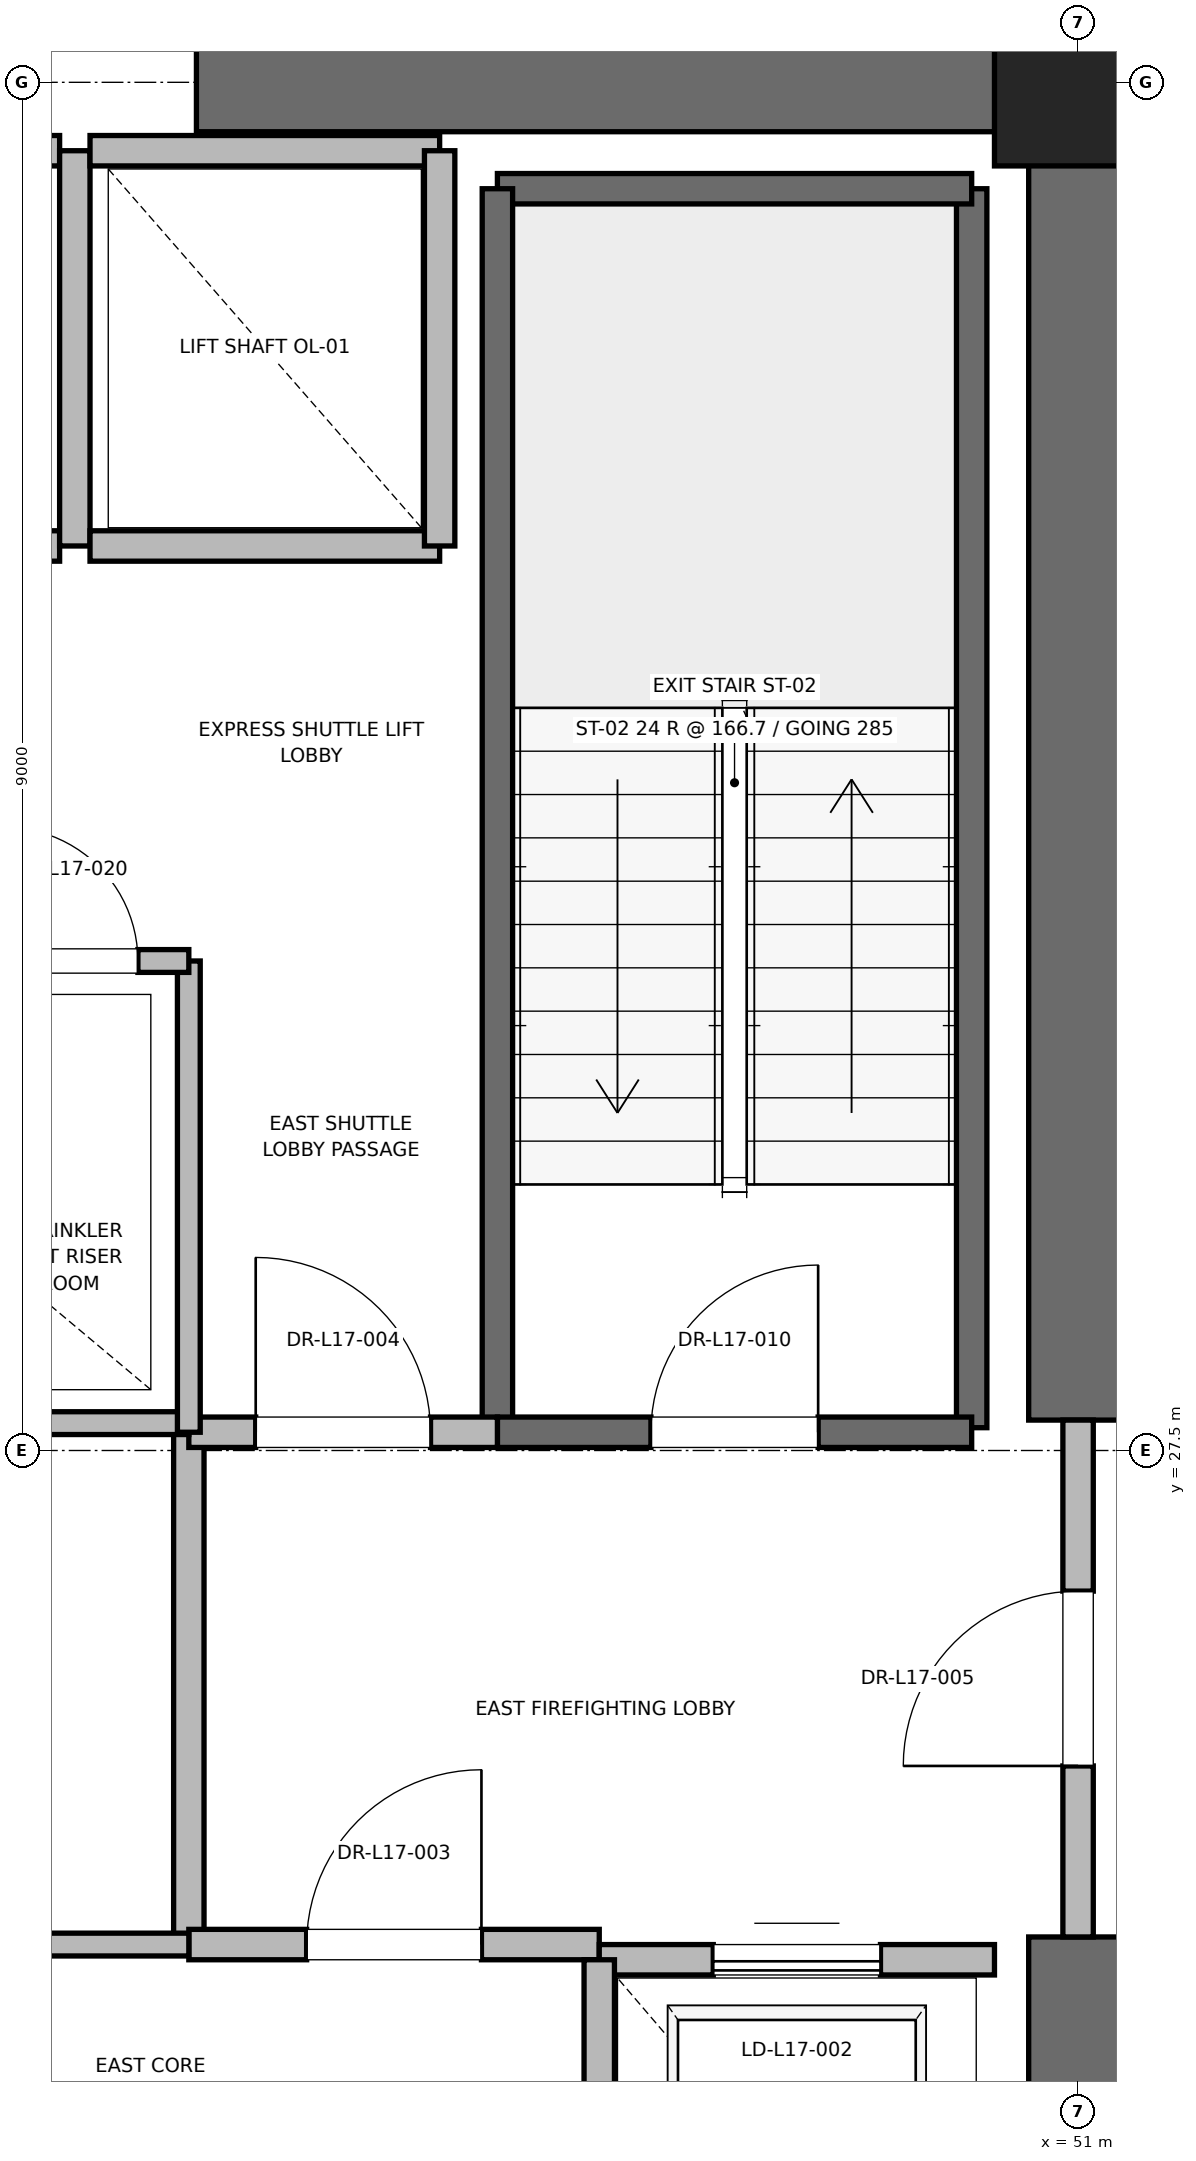
"""IFC4 building model, lengths in metres.
Left out: names, types, materials, properties, quantities, classifications, styles, units other than length and angle.
Written with IfcOpenShell. Run it as: python <this file> out.ifc"""

import sys

from ifc_helpers import new_model, si_unit, direction, frame, frame_2d, origin, origin_2d, place, context, subcontext, project, spatial, rectangle, extrude, element, fill, save


model = new_model("IFC4")
c1 = context("Model", 3, precision=1e-05, world=origin(), true_north=direction((0.0, 1.0)))
c2 = subcontext(c1, "Body", "Model", "MODEL_VIEW")
j1 = project(units=[si_unit("LENGTHUNIT", "METRE"), si_unit("PLANEANGLEUNIT", "RADIAN")], contexts=[c1])
p1 = place(None, origin())
s1 = spatial("IfcSite", under=j1, at=p1, CompositionType="ELEMENT")
p2 = place(p1, origin())
s2 = spatial("IfcBuilding", under=s1, at=p2, CompositionType="ELEMENT")
p3 = place(p2, frame((0.0, 0.0, 75.6)))
s3 = spatial("IfcBuildingStorey", under=s2, at=p3, CompositionType="ELEMENT", Elevation=75.6)
p4 = place(p3, frame((51.0, 36.5, 0.0), z_axis=(0.0, 0.0, 1.0), x_axis=(1.0, 0.0, 0.0)))
e1 = element("IfcColumn", 1, at=p4, inside=s3, PredefinedType="PILASTER", context=c2, shape_type="SweptSolid", body=[
    extrude(rectangle(XDim=1.1, YDim=1.1, at=origin_2d()), origin(), (0.0, 0.0, 1.0), 4.0),
])
for number, where, z_axis, x_axis in (
    (2, (45.2, 36.5, 0.0), (0.0, 0.0, 1.0), (1.0, 0.0, 0.0)),
    (3, (51.0, 18.5, 0.0), (0.0, 0.0, 1.0), (0.0, 1.0, 0.0)),
):
    element("IfcWall", number, at=place(p3, frame(where, z_axis=z_axis, x_axis=x_axis)), inside=s3, PredefinedType="SHEAR", context=c2, shape_type="SweptSolid", body=[
        extrude(rectangle(XDim=5.8, YDim=0.65, at=frame_2d((2.9, 0.0))), origin(), (0.0, 0.0, 1.0), 3.76),
    ])
p5 = place(p3, frame((51.0, 27.7, 0.0), z_axis=(0.0, 0.0, 1.0), x_axis=(0.0, 1.0, 0.0)))
e4 = element("IfcWall", 4, at=p5, inside=s3, PredefinedType="SHEAR", context=c2, shape_type="SweptSolid", body=[
    extrude(rectangle(XDim=8.8, YDim=0.65, at=frame_2d((4.4, 0.0))), origin(), (0.0, 0.0, 1.0), 3.76),
])
p6 = place(p3, frame((50.3, 27.65, 0.0), z_axis=(0.0, 0.0, 1.0), x_axis=(0.0, 1.0, 0.0)))
e5 = element("IfcWall", 5, at=p6, inside=s3, PredefinedType="SOLIDWALL", context=c2, shape_type="SweptSolid", body=[
    extrude(rectangle(XDim=8.15, YDim=0.2, at=frame_2d((4.075, 0.0))), origin(), (0.0, 0.0, 1.0), 3.76),
])
p7 = place(p3, frame((47.18, 35.8, 0.0), z_axis=(0.0, 0.0, 1.0), x_axis=(1.0, 0.0, 0.0)))
e6 = element("IfcWall", 6, at=p7, inside=s3, PredefinedType="SOLIDWALL", context=c2, shape_type="SweptSolid", body=[
    extrude(rectangle(XDim=3.12, YDim=0.2, at=frame_2d((1.56, 0.0))), origin(), (0.0, 0.0, 1.0), 3.76),
])
p8 = place(p3, frame((47.18, 27.62, 0.0), z_axis=(0.0, 0.0, 1.0), x_axis=(0.0, 1.0, 0.0)))
e7 = element("IfcWall", 7, at=p8, inside=s3, PredefinedType="SOLIDWALL", context=c2, shape_type="SweptSolid", body=[
    extrude(rectangle(XDim=8.18, YDim=0.2, at=frame_2d((4.09, 0.0))), origin(), (0.0, 0.0, 1.0), 3.76),
])
p9 = place(p3, frame((47.18, 27.62, 0.0), z_axis=(0.0, 0.0, 1.0), x_axis=(1.0, 0.0, 0.0)))
e8 = element("IfcWall", 8, at=p9, inside=s3, PredefinedType="SOLIDWALL", context=c2, shape_type="SweptSolid", body=[
    extrude(rectangle(XDim=3.12, YDim=0.2, at=frame_2d((1.56, 0.0))), origin(), (0.0, 0.0, 1.0), 3.76),
])
p10 = place(p9, frame((1.01, 0.0, 0.0)))
e9 = element("IfcOpeningElement", 9, at=p10, cuts=e8, PredefinedType="OPENING", context=c2, shape_type="SweptSolid", body=[
    extrude(rectangle(XDim=1.1, YDim=2.15, at=frame_2d((0.55, 1.075))), frame((0.0, 0.1, 0.0), z_axis=(0.0, -1.0, 0.0), x_axis=(1.0, 0.0, 0.0)), (0.0, 0.0, 1.0), 0.2),
])
p11 = place(p3, frame((45.15, 24.25, 0.0), z_axis=(0.0, 0.0, 1.0), x_axis=(0.0, 1.0, 0.0)))
e10 = element("IfcWall", 10, at=p11, inside=s3, PredefinedType="PARTITIONING", context=c2, shape_type="SweptSolid", body=[
    extrude(rectangle(XDim=3.37, YDim=0.2, at=frame_2d((1.685, 0.0))), origin(), (0.0, 0.0, 1.0), 3.76),
])
p12 = place(p3, frame((45.15, 24.25, 0.0), z_axis=(0.0, 0.0, 1.0), x_axis=(1.0, 0.0, 0.0)))
e11 = element("IfcWall", 11, at=p12, inside=s3, PredefinedType="PARTITIONING", context=c2, shape_type="SweptSolid", body=[
    extrude(rectangle(XDim=2.7, YDim=0.2, at=frame_2d((1.35, 0.0))), origin(), (0.0, 0.0, 1.0), 3.76),
])
p13 = place(p12, frame((0.775, 0.0, 0.0)))
e12 = element("IfcOpeningElement", 12, at=p13, cuts=e11, PredefinedType="OPENING", context=c2, shape_type="SweptSolid", body=[
    extrude(rectangle(XDim=1.15, YDim=2.2, at=frame_2d((0.575, 1.1))), frame((0.0, 0.1, 0.0), z_axis=(0.0, -1.0, 0.0), x_axis=(1.0, 0.0, 0.0)), (0.0, 0.0, 1.0), 0.2),
])
p14 = place(p3, frame((45.15, 27.62, 0.0), z_axis=(0.0, 0.0, 1.0), x_axis=(1.0, 0.0, 0.0)))
e13 = element("IfcWall", 13, at=p14, inside=s3, PredefinedType="PARTITIONING", context=c2, shape_type="SweptSolid", body=[
    extrude(rectangle(XDim=2.03, YDim=0.2, at=frame_2d((1.015, 0.0))), origin(), (0.0, 0.0, 1.0), 3.76),
])
p15 = place(p14, frame((0.44, 0.0, 0.0)))
e14 = element("IfcOpeningElement", 14, at=p15, cuts=e13, PredefinedType="OPENING", context=c2, shape_type="SweptSolid", body=[
    extrude(rectangle(XDim=1.15, YDim=2.2, at=frame_2d((0.575, 1.1))), frame((0.0, 0.1, 0.0), z_axis=(0.0, -1.0, 0.0), x_axis=(1.0, 0.0, 0.0)), (0.0, 0.0, 1.0), 0.2),
])
p16 = place(p3, frame((51.0, 24.3, 0.0), z_axis=(0.0, 0.0, 1.0), x_axis=(0.0, 1.0, 0.0)))
e15 = element("IfcWall", 15, at=p16, inside=s3, PredefinedType="PARTITIONING", context=c2, shape_type="SweptSolid", body=[
    extrude(rectangle(XDim=3.4, YDim=0.2, at=frame_2d((1.7, 0.0))), origin(), (0.0, 0.0, 1.0), 2.54),
])
p17 = place(p16, frame((1.125, 0.0, 0.0)))
e16 = element("IfcOpeningElement", 16, at=p17, cuts=e15, PredefinedType="OPENING", context=c2, shape_type="SweptSolid", body=[
    extrude(rectangle(XDim=1.15, YDim=2.2, at=frame_2d((0.575, 1.1))), frame((0.0, 0.1, 0.0), z_axis=(0.0, -1.0, 0.0), x_axis=(1.0, 0.0, 0.0)), (0.0, 0.0, 1.0), 0.2),
])
p18 = place(p3, frame((50.45, 24.15, 0.0), z_axis=(0.0, 0.0, 1.0), x_axis=(-1.0, 0.0, 0.0)))
e17 = element("IfcWall", 17, at=p18, inside=s3, PredefinedType="SOLIDWALL", context=c2, shape_type="SweptSolid", body=[
    extrude(rectangle(XDim=2.6, YDim=0.2, at=frame_2d((1.3, 0.0))), origin(), (0.0, 0.0, 1.0), 2.54),
])
p19 = place(p18, frame((0.75, 0.0, 0.0)))
e18 = element("IfcOpeningElement", 18, at=p19, cuts=e17, PredefinedType="OPENING", context=c2, shape_type="SweptSolid", body=[
    extrude(rectangle(XDim=1.1, YDim=2.2, at=frame_2d((0.55, 1.1))), frame((0.0, 0.1, 0.0), z_axis=(0.0, -1.0, 0.0), x_axis=(1.0, 0.0, 0.0)), (0.0, 0.0, 1.0), 0.2),
])
p20 = place(p3, frame((47.85, 24.15, 0.0), z_axis=(0.0, 0.0, 1.0), x_axis=(0.0, -1.0, 0.0)))
e19 = element("IfcWall", 19, at=p20, inside=s3, PredefinedType="SOLIDWALL", context=c2, shape_type="SweptSolid", body=[
    extrude(rectangle(XDim=3.0, YDim=0.2, at=frame_2d((1.5, 0.0))), origin(), (0.0, 0.0, 1.0), 3.76),
])
p21 = place(p3, frame((42.0, 33.45, 0.0), z_axis=(0.0, 0.0, 1.0), x_axis=(1.0, 0.0, 0.0)))
e20 = element("IfcWall", 20, at=p21, inside=s3, PredefinedType="SOLIDWALL", context=c2, shape_type="SweptSolid", body=[
    extrude(rectangle(XDim=2.3, YDim=0.2, at=frame_2d((1.15, 0.0))), origin(), (0.0, 0.0, 1.0), 3.76),
])
p22 = place(p3, frame((44.3, 36.05, 0.0), z_axis=(0.0, 0.0, 1.0), x_axis=(-1.0, 0.0, 0.0)))
e21 = element("IfcWall", 21, at=p22, inside=s3, PredefinedType="SOLIDWALL", context=c2, shape_type="SweptSolid", body=[
    extrude(rectangle(XDim=2.3, YDim=0.2, at=frame_2d((1.15, 0.0))), origin(), (0.0, 0.0, 1.0), 2.54),
])
p23 = place(p3, frame((44.4, 33.45, 0.0), z_axis=(0.0, 0.0, 1.0), x_axis=(0.0, 1.0, 0.0)))
e22 = element("IfcWall", 22, at=p23, inside=s3, PredefinedType="SOLIDWALL", context=c2, shape_type="SweptSolid", body=[
    extrude(rectangle(XDim=2.6, YDim=0.2, at=frame_2d((1.3, 0.0))), origin(), (0.0, 0.0, 1.0), 2.54),
])
p24 = place(p3, frame((44.5, 33.45, 0.0), z_axis=(0.0, 0.0, 1.0), x_axis=(1.0, 0.0, 0.0)))
e23 = element("IfcWall", 23, at=p24, inside=s3, PredefinedType="SOLIDWALL", context=c2, shape_type="SweptSolid", body=[
    extrude(rectangle(XDim=2.3, YDim=0.2, at=frame_2d((1.15, 0.0))), origin(), (0.0, 0.0, 1.0), 3.76),
])
p25 = place(p3, frame((46.8, 36.05, 0.0), z_axis=(0.0, 0.0, 1.0), x_axis=(-1.0, 0.0, 0.0)))
e24 = element("IfcWall", 24, at=p25, inside=s3, PredefinedType="SOLIDWALL", context=c2, shape_type="SweptSolid", body=[
    extrude(rectangle(XDim=2.3, YDim=0.2, at=frame_2d((1.15, 0.0))), origin(), (0.0, 0.0, 1.0), 2.54),
])
p26 = place(p3, frame((46.8, 33.45, 0.0), z_axis=(0.0, 0.0, 1.0), x_axis=(0.0, 1.0, 0.0)))
e25 = element("IfcWall", 25, at=p26, inside=s3, PredefinedType="SOLIDWALL", context=c2, shape_type="SweptSolid", body=[
    extrude(rectangle(XDim=2.6, YDim=0.2, at=frame_2d((1.3, 0.0))), origin(), (0.0, 0.0, 1.0), 3.76),
])
p27 = place(p3, frame((41.56, 27.68, 0.0), z_axis=(0.0, 0.0, 1.0), x_axis=(1.0, 0.0, 0.0)))
e26 = element("IfcWall", 26, at=p27, inside=s3, PredefinedType="PARTITIONING", context=c2, shape_type="SweptSolid", body=[
    extrude(rectangle(XDim=3.59, YDim=0.15, at=frame_2d((1.795, 0.0))), origin(), (0.0, 0.0, 1.0), 2.85),
])
p28 = place(p3, frame((41.76, 24.25, 0.0), z_axis=(0.0, 0.0, 1.0), x_axis=(1.0, 0.0, 0.0)))
e27 = element("IfcWall", 27, at=p28, inside=s3, PredefinedType="PARTITIONING", context=c2, shape_type="SweptSolid", body=[
    extrude(rectangle(XDim=3.39, YDim=0.15, at=frame_2d((1.695, 0.0))), origin(), (0.0, 0.0, 1.0), 2.85),
])
p29 = place(p28, frame((1.255, 0.0, 0.0)))
e28 = element("IfcOpeningElement", 28, at=p29, cuts=e27, PredefinedType="OPENING", context=c2, shape_type="SweptSolid", body=[
    extrude(rectangle(XDim=0.88, YDim=2.1, at=frame_2d((0.44, 1.05))), frame((0.0, 0.075, 0.0), z_axis=(0.0, -1.0, 0.0), x_axis=(1.0, 0.0, 0.0)), (0.0, 0.0, 1.0), 0.15),
])
p30 = place(p3, frame((45.15, 27.62, 0.0), z_axis=(0.0, 0.0, 1.0), x_axis=(0.0, 1.0, 0.0)))
e29 = element("IfcWall", 29, at=p30, inside=s3, PredefinedType="PARTITIONING", context=c2, shape_type="SweptSolid", body=[
    extrude(rectangle(XDim=3.1, YDim=0.15, at=frame_2d((1.55, 0.0))), origin(), (0.0, 0.0, 1.0), 2.85),
])
p31 = place(p3, frame((43.6, 30.72, 0.0), z_axis=(0.0, 0.0, 1.0), x_axis=(1.0, 0.0, 0.0)))
e30 = element("IfcWall", 30, at=p31, inside=s3, PredefinedType="PARTITIONING", context=c2, shape_type="SweptSolid", body=[
    extrude(rectangle(XDim=1.55, YDim=0.15, at=frame_2d((0.775, 0.0))), origin(), (0.0, 0.0, 1.0), 2.85),
])
p32 = place(p31, frame((0.335, 0.0, 0.0)))
e31 = element("IfcOpeningElement", 31, at=p32, cuts=e30, PredefinedType="OPENING", context=c2, shape_type="SweptSolid", body=[
    extrude(rectangle(XDim=0.88, YDim=2.1, at=frame_2d((0.44, 1.05))), frame((0.0, 0.075, 0.0), z_axis=(0.0, -1.0, 0.0), x_axis=(1.0, 0.0, 0.0)), (0.0, 0.0, 1.0), 0.15),
])
p33 = place(p10, origin())
e32 = element("IfcDoor", 32, at=p33, inside=s3, OperationType="SINGLE_SWING_RIGHT", PredefinedType="DOOR", context=c2, shape_type="SweptSolid", body=[
    extrude(rectangle(XDim=1.1, YDim=2.15, at=frame_2d((0.55, 1.075))), frame((0.0, 0.025, 0.0), z_axis=(0.0, -1.0, 0.0), x_axis=(1.0, 0.0, 0.0)), (0.0, 0.0, 1.0), 0.05),
])
fill(e9, e32)
p34 = place(p13, origin())
e33 = element("IfcDoor", 33, at=p34, inside=s3, OperationType="SINGLE_SWING_RIGHT", PredefinedType="DOOR", context=c2, shape_type="SweptSolid", body=[
    extrude(rectangle(XDim=1.15, YDim=2.2, at=frame_2d((0.575, 1.1))), frame((0.0, 0.025, 0.0), z_axis=(0.0, -1.0, 0.0), x_axis=(1.0, 0.0, 0.0)), (0.0, 0.0, 1.0), 0.05),
])
fill(e12, e33)
p35 = place(p15, origin())
e34 = element("IfcDoor", 34, at=p35, inside=s3, OperationType="SINGLE_SWING_LEFT", PredefinedType="DOOR", context=c2, shape_type="SweptSolid", body=[
    extrude(rectangle(XDim=1.15, YDim=2.2, at=frame_2d((0.575, 1.1))), frame((0.0, 0.025, 0.0), z_axis=(0.0, -1.0, 0.0), x_axis=(1.0, 0.0, 0.0)), (0.0, 0.0, 1.0), 0.05),
])
fill(e14, e34)
p36 = place(p17, origin())
e35 = element("IfcDoor", 35, at=p36, inside=s3, OperationType="SINGLE_SWING_LEFT", PredefinedType="DOOR", context=c2, shape_type="SweptSolid", body=[
    extrude(rectangle(XDim=1.15, YDim=2.2, at=frame_2d((0.575, 1.1))), frame((0.0, 0.025, 0.0), z_axis=(0.0, -1.0, 0.0), x_axis=(1.0, 0.0, 0.0)), (0.0, 0.0, 1.0), 0.05),
])
fill(e16, e35)
p37 = place(p19, origin())
e36 = element("IfcDoor", 36, at=p37, inside=s3, OperationType="SLIDING_TO_RIGHT", PredefinedType="DOOR", context=c2, shape_type="SweptSolid", body=[
    extrude(rectangle(XDim=1.1, YDim=2.2, at=frame_2d((0.55, 1.1))), frame((0.0, 0.025, 0.0), z_axis=(0.0, -1.0, 0.0), x_axis=(1.0, 0.0, 0.0)), (0.0, 0.0, 1.0), 0.05),
])
fill(e18, e36)
p38 = place(p32, origin())
e37 = element("IfcDoor", 37, at=p38, inside=s3, OperationType="SINGLE_SWING_LEFT", PredefinedType="DOOR", context=c2, shape_type="SweptSolid", body=[
    extrude(rectangle(XDim=0.88, YDim=2.1, at=frame_2d((0.44, 1.05))), frame((0.0, 0.025, 0.0), z_axis=(0.0, -1.0, 0.0), x_axis=(1.0, 0.0, 0.0)), (0.0, 0.0, 1.0), 0.05),
])
fill(e31, e37)
save(model, sys.argv[1])
